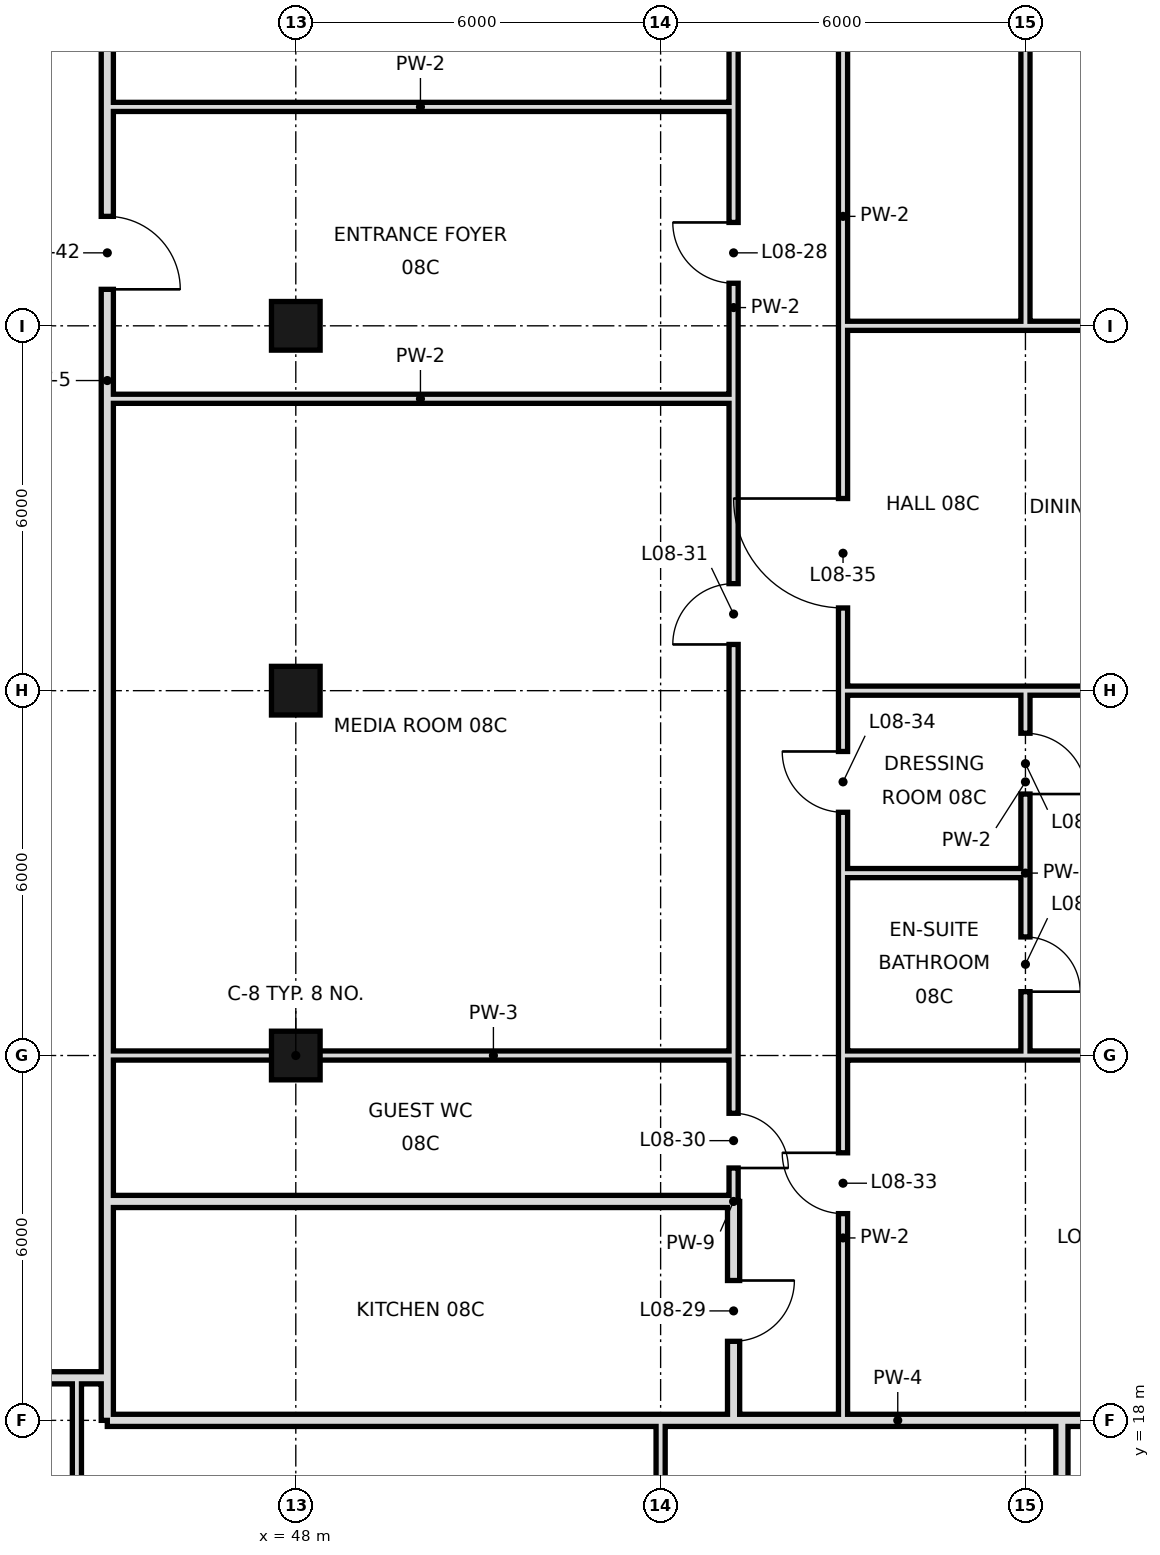
"""IFC4 building model, lengths in metres.
Left out: names, types, materials, properties, quantities, classifications, styles, units other than length and angle.
Written with IfcOpenShell. Run it as: python <this file> out.ifc"""

import sys

from ifc_helpers import new_model, si_unit, direction, frame, frame_2d, origin, origin_2d, place, context, subcontext, project, spatial, rectangle, hollow_rectangle, extrude, element, fill, save


model = new_model("IFC4")
c1 = context("Model", 3, precision=1e-05, world=origin(), true_north=direction((0.0, 1.0)))
c2 = subcontext(c1, "Body", "Model", "MODEL_VIEW")
j1 = project(units=[si_unit("LENGTHUNIT", "METRE"), si_unit("PLANEANGLEUNIT", "RADIAN")], contexts=[c1])
p1 = place(None, origin())
s1 = spatial("IfcSite", under=j1, at=p1, CompositionType="ELEMENT")
p2 = place(p1, origin())
s2 = spatial("IfcBuilding", under=s1, at=p2, CompositionType="ELEMENT")
p3 = place(p2, frame((0.0, 0.0, 49.8)))
s3 = spatial("IfcBuildingStorey", under=s2, at=p3, CompositionType="ELEMENT", Elevation=49.8)
for number, where, z_axis, x_axis in (
    (1, (48.0, 24.0, 0.0), (0.0, 0.0, 1.0), (1.0, 0.0, 0.0)),
    (2, (48.0, 30.0, 0.0), (0.0, 0.0, 1.0), (1.0, 0.0, 0.0)),
    (3, (48.0, 36.0, 0.0), (0.0, 0.0, 1.0), (1.0, 0.0, 0.0)),
):
    element("IfcColumn", number, at=place(p3, frame(where, z_axis=z_axis, x_axis=x_axis)), inside=s3, PredefinedType="COLUMN", context=c2, shape_type="SweptSolid", body=[
        extrude(hollow_rectangle(XDim=0.8, YDim=0.8, WallThickness=0.04, at=origin_2d()), origin(), (0.0, 0.0, 1.0), 3.6),
    ])
p4 = place(p3, frame((44.4, 10.8, 0.0), z_axis=(0.0, 0.0, 1.0), x_axis=(0.0, 1.0, 0.0)))
e4 = element("IfcWall", 4, at=p4, inside=s3, PredefinedType="PARTITIONING", context=c2, shape_type="SweptSolid", body=[
    extrude(rectangle(XDim=7.9, YDim=0.15, at=frame_2d((3.95, 0.0))), origin(), (0.0, 0.0, 1.0), 3.42),
])
p5 = place(p3, frame((44.9, 21.6, 0.0), z_axis=(0.0, 0.0, 1.0), x_axis=(0.0, 1.0, 0.0)))
e5 = element("IfcWall", 5, at=p5, inside=s3, PredefinedType="SOLIDWALL", context=c2, shape_type="SweptSolid", body=[
    extrude(rectangle(XDim=27.0, YDim=0.2, at=frame_2d((13.5, 0.0))), origin(), (0.0, 0.0, 1.0), 2.72),
])
p6 = place(p5, frame((15.0, 0.0, 0.0)))
e6 = element("IfcOpeningElement", 6, at=p6, cuts=e5, PredefinedType="OPENING", context=c2, shape_type="SweptSolid", body=[
    extrude(rectangle(XDim=1.2, YDim=2.4, at=frame_2d((0.6, 1.2))), frame((0.0, 0.11, 0.0), z_axis=(0.0, -1.0, 0.0), x_axis=(1.0, 0.0, 0.0)), (0.0, 0.0, 1.0), 0.22),
])
p7 = place(p3, frame((44.9, 18.0, 0.0), z_axis=(0.0, 0.0, 1.0), x_axis=(0.0, 1.0, 0.0)))
e7 = element("IfcWall", 7, at=p7, inside=s3, PredefinedType="SOLIDWALL", context=c2, shape_type="SweptSolid", body=[
    extrude(rectangle(XDim=3.6, YDim=0.2, at=frame_2d((1.8, 0.0))), origin(), (0.0, 0.0, 1.0), 2.97),
])
p8 = place(p3, frame((54.0, 10.8, 0.0), z_axis=(0.0, 0.0, 1.0), x_axis=(0.0, 1.0, 0.0)))
e8 = element("IfcWall", 8, at=p8, inside=s3, PredefinedType="PARTITIONING", context=c2, shape_type="SweptSolid", body=[
    extrude(rectangle(XDim=7.2, YDim=0.15, at=frame_2d((3.6, 0.0))), origin(), (0.0, 0.0, 1.0), 3.42),
])
p9 = place(p3, frame((55.2, 18.0, 0.0), z_axis=(0.0, 0.0, 1.0), x_axis=(0.0, 1.0, 0.0)))
e9 = element("IfcWall", 9, at=p9, inside=s3, PredefinedType="SOLIDWALL", context=c2, shape_type="SweptSolid", body=[
    extrude(rectangle(XDim=3.6, YDim=0.2, at=frame_2d((1.8, 0.0))), origin(), (0.0, 0.0, 1.0), 2.52),
])
p10 = place(p9, frame((1.3, 0.0, 0.0)))
e10 = element("IfcOpeningElement", 10, at=p10, cuts=e9, PredefinedType="OPENING", context=c2, shape_type="SweptSolid", body=[
    extrude(rectangle(XDim=1.0, YDim=2.4, at=frame_2d((0.5, 1.2))), frame((0.0, 0.11, 0.0), z_axis=(0.0, -1.0, 0.0), x_axis=(1.0, 0.0, 0.0)), (0.0, 0.0, 1.0), 0.22),
])
p11 = place(p3, frame((55.2, 24.0, 0.0), z_axis=(0.0, 0.0, 1.0), x_axis=(0.0, 1.0, 0.0)))
e11 = element("IfcWall", 11, at=p11, inside=s3, PredefinedType="PARTITIONING", context=c2, shape_type="SweptSolid", body=[
    extrude(rectangle(XDim=24.6, YDim=0.15, at=frame_2d((12.3, 0.0))), origin(), (0.0, 0.0, 1.0), 3.42),
])
p12 = place(p11, frame((12.7, 0.0, 0.0)))
e12 = element("IfcOpeningElement", 12, at=p12, cuts=e11, PredefinedType="OPENING", context=c2, shape_type="SweptSolid", body=[
    extrude(rectangle(XDim=1.0, YDim=2.4, at=frame_2d((0.5, 1.2))), frame((0.0, 0.085, 0.0), z_axis=(0.0, -1.0, 0.0), x_axis=(1.0, 0.0, 0.0)), (0.0, 0.0, 1.0), 0.17),
])
p13 = place(p11, frame((6.76, 0.0, 0.0)))
e13 = element("IfcOpeningElement", 13, at=p13, cuts=e11, PredefinedType="OPENING", context=c2, shape_type="SweptSolid", body=[
    extrude(rectangle(XDim=1.0, YDim=2.4, at=frame_2d((0.5, 1.2))), frame((0.0, 0.085, 0.0), z_axis=(0.0, -1.0, 0.0), x_axis=(1.0, 0.0, 0.0)), (0.0, 0.0, 1.0), 0.17),
])
p14 = place(p11, frame((20.68, 0.0, 0.0)))
e14 = element("IfcOpeningElement", 14, at=p14, cuts=e11, PredefinedType="OPENING", context=c2, shape_type="SweptSolid", body=[
    extrude(rectangle(XDim=1.0, YDim=2.4, at=frame_2d((0.5, 1.2))), frame((0.0, 0.085, 0.0), z_axis=(0.0, -1.0, 0.0), x_axis=(1.0, 0.0, 0.0)), (0.0, 0.0, 1.0), 0.17),
])
p15 = place(p3, frame((55.2, 21.6, 0.0), z_axis=(0.0, 0.0, 1.0), x_axis=(0.0, 1.0, 0.0)))
e15 = element("IfcWall", 15, at=p15, inside=s3, PredefinedType="PARTITIONING", context=c2, shape_type="SweptSolid", body=[
    extrude(rectangle(XDim=2.4, YDim=0.15, at=frame_2d((1.2, 0.0))), origin(), (0.0, 0.0, 1.0), 3.42),
])
p16 = place(p15, frame((0.55, 0.0, 0.0)))
e16 = element("IfcOpeningElement", 16, at=p16, cuts=e15, PredefinedType="OPENING", context=c2, shape_type="SweptSolid", body=[
    extrude(rectangle(XDim=0.9, YDim=2.4, at=frame_2d((0.45, 1.2))), frame((0.0, 0.085, 0.0), z_axis=(0.0, -1.0, 0.0), x_axis=(1.0, 0.0, 0.0)), (0.0, 0.0, 1.0), 0.17),
])
p17 = place(p3, frame((57.0, 18.0, 0.0), z_axis=(0.0, 0.0, 1.0), x_axis=(0.0, 1.0, 0.0)))
e17 = element("IfcWall", 17, at=p17, inside=s3, PredefinedType="PARTITIONING", context=c2, shape_type="SweptSolid", body=[
    extrude(rectangle(XDim=6.0, YDim=0.15, at=frame_2d((3.0, 0.0))), origin(), (0.0, 0.0, 1.0), 3.42),
])
p18 = place(p17, frame((3.4, 0.0, 0.0)))
e18 = element("IfcOpeningElement", 18, at=p18, cuts=e17, PredefinedType="OPENING", context=c2, shape_type="SweptSolid", body=[
    extrude(rectangle(XDim=1.0, YDim=2.4, at=frame_2d((0.5, 1.2))), frame((0.0, 0.085, 0.0), z_axis=(0.0, -1.0, 0.0), x_axis=(1.0, 0.0, 0.0)), (0.0, 0.0, 1.0), 0.17),
])
p19 = place(p3, frame((57.0, 27.0, 0.0), z_axis=(0.0, 0.0, 1.0), x_axis=(0.0, 1.0, 0.0)))
e19 = element("IfcWall", 19, at=p19, inside=s3, PredefinedType="PARTITIONING", context=c2, shape_type="SweptSolid", body=[
    extrude(rectangle(XDim=21.6, YDim=0.15, at=frame_2d((10.8, 0.0))), origin(), (0.0, 0.0, 1.0), 3.42),
])
p20 = place(p19, frame((1.0, 0.0, 0.0)))
e20 = element("IfcOpeningElement", 20, at=p20, cuts=e19, PredefinedType="OPENING", context=c2, shape_type="SweptSolid", body=[
    extrude(rectangle(XDim=1.0, YDim=2.4, at=frame_2d((0.5, 1.2))), frame((0.0, 0.085, 0.0), z_axis=(0.0, -1.0, 0.0), x_axis=(1.0, 0.0, 0.0)), (0.0, 0.0, 1.0), 0.17),
])
p21 = place(p19, frame((4.36, 0.0, 0.0)))
e21 = element("IfcOpeningElement", 21, at=p21, cuts=e19, PredefinedType="OPENING", context=c2, shape_type="SweptSolid", body=[
    extrude(rectangle(XDim=1.8, YDim=2.4, at=frame_2d((0.9, 1.2))), frame((0.0, 0.085, 0.0), z_axis=(0.0, -1.0, 0.0), x_axis=(1.0, 0.0, 0.0)), (0.0, 0.0, 1.0), 0.17),
])
p22 = place(p19, frame((14.1, 0.0, 0.0)))
e22 = element("IfcOpeningElement", 22, at=p22, cuts=e19, PredefinedType="OPENING", context=c2, shape_type="SweptSolid", body=[
    extrude(rectangle(XDim=1.8, YDim=2.4, at=frame_2d((0.9, 1.2))), frame((0.0, 0.085, 0.0), z_axis=(0.0, -1.0, 0.0), x_axis=(1.0, 0.0, 0.0)), (0.0, 0.0, 1.0), 0.17),
])
p23 = place(p3, frame((57.0, 24.0, 0.0), z_axis=(0.0, 0.0, 1.0), x_axis=(0.0, 1.0, 0.0)))
e23 = element("IfcWall", 23, at=p23, inside=s3, PredefinedType="PARTITIONING", context=c2, shape_type="SweptSolid", body=[
    extrude(rectangle(XDim=3.0, YDim=0.15, at=frame_2d((1.5, 0.0))), origin(), (0.0, 0.0, 1.0), 3.42),
])
p24 = place(p3, frame((60.0, 27.0, 0.0), z_axis=(0.0, 0.0, 1.0), x_axis=(0.0, 1.0, 0.0)))
e24 = element("IfcWall", 24, at=p24, inside=s3, PredefinedType="PARTITIONING", context=c2, shape_type="SweptSolid", body=[
    extrude(rectangle(XDim=3.0, YDim=0.15, at=frame_2d((1.5, 0.0))), origin(), (0.0, 0.0, 1.0), 3.42),
])
p25 = place(p24, frame((1.3, 0.0, 0.0)))
e25 = element("IfcOpeningElement", 25, at=p25, cuts=e24, PredefinedType="OPENING", context=c2, shape_type="SweptSolid", body=[
    extrude(rectangle(XDim=1.0, YDim=2.4, at=frame_2d((0.5, 1.2))), frame((0.0, 0.085, 0.0), z_axis=(0.0, -1.0, 0.0), x_axis=(1.0, 0.0, 0.0)), (0.0, 0.0, 1.0), 0.17),
])
p26 = place(p3, frame((60.0, 36.0, 0.0), z_axis=(0.0, 0.0, 1.0), x_axis=(0.0, 1.0, 0.0)))
e26 = element("IfcWall", 26, at=p26, inside=s3, PredefinedType="PARTITIONING", context=c2, shape_type="SweptSolid", body=[
    extrude(rectangle(XDim=12.0, YDim=0.15, at=frame_2d((6.0, 0.0))), origin(), (0.0, 0.0, 1.0), 3.42),
])
p27 = place(p3, frame((60.0, 24.0, 0.0), z_axis=(0.0, 0.0, 1.0), x_axis=(0.0, 1.0, 0.0)))
e27 = element("IfcWall", 27, at=p27, inside=s3, PredefinedType="PARTITIONING", context=c2, shape_type="SweptSolid", body=[
    extrude(rectangle(XDim=3.0, YDim=0.15, at=frame_2d((1.5, 0.0))), origin(), (0.0, 0.0, 1.0), 3.42),
])
p28 = place(p27, frame((1.05, 0.0, 0.0)))
e28 = element("IfcOpeningElement", 28, at=p28, cuts=e27, PredefinedType="OPENING", context=c2, shape_type="SweptSolid", body=[
    extrude(rectangle(XDim=0.9, YDim=2.4, at=frame_2d((0.45, 1.2))), frame((0.0, 0.085, 0.0), z_axis=(0.0, -1.0, 0.0), x_axis=(1.0, 0.0, 0.0)), (0.0, 0.0, 1.0), 0.17),
])
p29 = place(p3, frame((60.6, 10.8, 0.0), z_axis=(0.0, 0.0, 1.0), x_axis=(0.0, 1.0, 0.0)))
e29 = element("IfcWall", 29, at=p29, inside=s3, PredefinedType="SOLIDWALL", context=c2, shape_type="SweptSolid", body=[
    extrude(rectangle(XDim=7.2, YDim=0.2, at=frame_2d((3.6, 0.0))), origin(), (0.0, 0.0, 1.0), 2.52),
])
p30 = place(p3, frame((44.9, 18.0, 0.0), z_axis=(0.0, 0.0, 1.0), x_axis=(1.0, 0.0, 0.0)))
e30 = element("IfcWall", 30, at=p30, inside=s3, PredefinedType="SOLIDWALL", context=c2, shape_type="SweptSolid", body=[
    extrude(rectangle(XDim=10.3, YDim=0.2, at=frame_2d((5.15, 0.0))), origin(), (0.0, 0.0, 1.0), 2.52),
])
p31 = place(p3, frame((60.6, 18.0, 0.0), z_axis=(0.0, 0.0, 1.0), x_axis=(1.0, 0.0, 0.0)))
e31 = element("IfcWall", 31, at=p31, inside=s3, PredefinedType="SOLIDWALL", context=c2, shape_type="SweptSolid", body=[
    extrude(rectangle(XDim=6.0, YDim=0.2, at=frame_2d((3.0, 0.0))), origin(), (0.0, 0.0, 1.0), 2.52),
])
p32 = place(p3, frame((55.2, 18.0, 0.0), z_axis=(0.0, 0.0, 1.0), x_axis=(1.0, 0.0, 0.0)))
e32 = element("IfcWall", 32, at=p32, inside=s3, PredefinedType="SOLIDWALL", context=c2, shape_type="SweptSolid", body=[
    extrude(rectangle(XDim=5.4, YDim=0.2, at=frame_2d((2.7, 0.0))), origin(), (0.0, 0.0, 1.0), 2.52),
])
p33 = place(p3, frame((6.6, 18.7, 0.0), z_axis=(0.0, 0.0, 1.0), x_axis=(1.0, 0.0, 0.0)))
e33 = element("IfcWall", 33, at=p33, inside=s3, PredefinedType="SOLIDWALL", context=c2, shape_type="SweptSolid", body=[
    extrude(rectangle(XDim=38.3, YDim=0.2, at=frame_2d((19.15, 0.0))), origin(), (0.0, 0.0, 1.0), 2.72),
])
p34 = place(p33, frame((25.8, 0.0, 0.0)))
e34 = element("IfcOpeningElement", 34, at=p34, cuts=e33, PredefinedType="OPENING", context=c2, shape_type="SweptSolid", body=[
    extrude(rectangle(XDim=1.2, YDim=2.4, at=frame_2d((0.6, 1.2))), frame((0.0, 0.11, 0.0), z_axis=(0.0, -1.0, 0.0), x_axis=(1.0, 0.0, 0.0)), (0.0, 0.0, 1.0), 0.22),
])
p35 = place(p33, frame((33.34, 0.0, 0.0)))
e35 = element("IfcOpeningElement", 35, at=p35, cuts=e33, PredefinedType="OPENING", context=c2, shape_type="SweptSolid", body=[
    extrude(rectangle(XDim=1.2, YDim=2.4, at=frame_2d((0.6, 1.2))), frame((0.0, 0.11, 0.0), z_axis=(0.0, -1.0, 0.0), x_axis=(1.0, 0.0, 0.0)), (0.0, 0.0, 1.0), 0.22),
])
p36 = place(p3, frame((44.9, 21.6, 0.0), z_axis=(0.0, 0.0, 1.0), x_axis=(1.0, 0.0, 0.0)))
e36 = element("IfcWall", 36, at=p36, inside=s3, PredefinedType="SOLIDWALL", context=c2, shape_type="SweptSolid", body=[
    extrude(rectangle(XDim=10.3, YDim=0.2, at=frame_2d((5.15, 0.0))), origin(), (0.0, 0.0, 1.0), 2.72),
])
p37 = place(p3, frame((60.0, 24.0, 0.0), z_axis=(0.0, 0.0, 1.0), x_axis=(1.0, 0.0, 0.0)))
e37 = element("IfcWall", 37, at=p37, inside=s3, PredefinedType="PARTITIONING", context=c2, shape_type="SweptSolid", body=[
    extrude(rectangle(XDim=6.0, YDim=0.15, at=frame_2d((3.0, 0.0))), origin(), (0.0, 0.0, 1.0), 2.52),
])
p38 = place(p3, frame((44.9, 24.0, 0.0), z_axis=(0.0, 0.0, 1.0), x_axis=(1.0, 0.0, 0.0)))
e38 = element("IfcWall", 38, at=p38, inside=s3, PredefinedType="PARTITIONING", context=c2, shape_type="SweptSolid", body=[
    extrude(rectangle(XDim=10.3, YDim=0.15, at=frame_2d((5.15, 0.0))), origin(), (0.0, 0.0, 1.0), 2.52),
])
p39 = place(p3, frame((57.0, 24.0, 0.0), z_axis=(0.0, 0.0, 1.0), x_axis=(1.0, 0.0, 0.0)))
e39 = element("IfcWall", 39, at=p39, inside=s3, PredefinedType="PARTITIONING", context=c2, shape_type="SweptSolid", body=[
    extrude(rectangle(XDim=3.0, YDim=0.15, at=frame_2d((1.5, 0.0))), origin(), (0.0, 0.0, 1.0), 2.52),
])
p40 = place(p3, frame((57.0, 27.0, 0.0), z_axis=(0.0, 0.0, 1.0), x_axis=(1.0, 0.0, 0.0)))
e40 = element("IfcWall", 40, at=p40, inside=s3, PredefinedType="PARTITIONING", context=c2, shape_type="SweptSolid", body=[
    extrude(rectangle(XDim=3.0, YDim=0.15, at=frame_2d((1.5, 0.0))), origin(), (0.0, 0.0, 1.0), 3.42),
])
p41 = place(p3, frame((57.0, 30.0, 0.0), z_axis=(0.0, 0.0, 1.0), x_axis=(1.0, 0.0, 0.0)))
e41 = element("IfcWall", 41, at=p41, inside=s3, PredefinedType="PARTITIONING", context=c2, shape_type="SweptSolid", body=[
    extrude(rectangle(XDim=9.6, YDim=0.15, at=frame_2d((4.8, 0.0))), origin(), (0.0, 0.0, 1.0), 2.52),
])
p42 = place(p3, frame((44.9, 34.8, 0.0), z_axis=(0.0, 0.0, 1.0), x_axis=(1.0, 0.0, 0.0)))
e42 = element("IfcWall", 42, at=p42, inside=s3, PredefinedType="PARTITIONING", context=c2, shape_type="SweptSolid", body=[
    extrude(rectangle(XDim=10.3, YDim=0.15, at=frame_2d((5.15, 0.0))), origin(), (0.0, 0.0, 1.0), 3.42),
])
p43 = place(p3, frame((57.0, 36.0, 0.0), z_axis=(0.0, 0.0, 1.0), x_axis=(1.0, 0.0, 0.0)))
e43 = element("IfcWall", 43, at=p43, inside=s3, PredefinedType="PARTITIONING", context=c2, shape_type="SweptSolid", body=[
    extrude(rectangle(XDim=9.0, YDim=0.15, at=frame_2d((4.5, 0.0))), origin(), (0.0, 0.0, 1.0), 2.52),
])
p44 = place(p43, frame((5.1, 0.0, 0.0)))
e44 = element("IfcOpeningElement", 44, at=p44, cuts=e43, PredefinedType="OPENING", context=c2, shape_type="SweptSolid", body=[
    extrude(rectangle(XDim=1.8, YDim=2.4, at=frame_2d((0.9, 1.2))), frame((0.0, 0.085, 0.0), z_axis=(0.0, -1.0, 0.0), x_axis=(1.0, 0.0, 0.0)), (0.0, 0.0, 1.0), 0.17),
])
p45 = place(p3, frame((44.9, 39.6, 0.0), z_axis=(0.0, 0.0, 1.0), x_axis=(1.0, 0.0, 0.0)))
e45 = element("IfcWall", 45, at=p45, inside=s3, PredefinedType="PARTITIONING", context=c2, shape_type="SweptSolid", body=[
    extrude(rectangle(XDim=10.3, YDim=0.15, at=frame_2d((5.15, 0.0))), origin(), (0.0, 0.0, 1.0), 3.42),
])
p46 = place(p12, frame((1.0, 0.0, 0.0), z_axis=(0.0, 0.0, 1.0), x_axis=(-1.0, 0.0, 0.0)))
e46 = element("IfcDoor", 46, at=p46, inside=s3, OperationType="SINGLE_SWING_LEFT", PredefinedType="DOOR", context=c2, shape_type="SweptSolid", body=[
    extrude(rectangle(XDim=1.0, YDim=2.4, at=frame_2d((0.5, 1.2))), frame((0.0, 0.025, 0.0), z_axis=(0.0, -1.0, 0.0), x_axis=(1.0, 0.0, 0.0)), (0.0, 0.0, 1.0), 0.05),
])
fill(e12, e46)
p47 = place(p10, origin())
e47 = element("IfcDoor", 47, at=p47, inside=s3, OperationType="SINGLE_SWING_RIGHT", PredefinedType="DOOR", context=c2, shape_type="SweptSolid", body=[
    extrude(rectangle(XDim=1.0, YDim=2.4, at=frame_2d((0.5, 1.2))), frame((0.0, 0.025, 0.0), z_axis=(0.0, -1.0, 0.0), x_axis=(1.0, 0.0, 0.0)), (0.0, 0.0, 1.0), 0.05),
])
fill(e10, e47)
p48 = place(p16, frame((0.9, 0.0, 0.0), z_axis=(0.0, 0.0, 1.0), x_axis=(-1.0, 0.0, 0.0)))
e48 = element("IfcDoor", 48, at=p48, inside=s3, OperationType="SINGLE_SWING_RIGHT", PredefinedType="DOOR", context=c2, shape_type="SweptSolid", body=[
    extrude(rectangle(XDim=0.9, YDim=2.4, at=frame_2d((0.45, 1.2))), frame((0.0, 0.025, 0.0), z_axis=(0.0, -1.0, 0.0), x_axis=(1.0, 0.0, 0.0)), (0.0, 0.0, 1.0), 0.05),
])
fill(e16, e48)
p49 = place(p13, origin())
e49 = element("IfcDoor", 49, at=p49, inside=s3, OperationType="SINGLE_SWING_LEFT", PredefinedType="DOOR", context=c2, shape_type="SweptSolid", body=[
    extrude(rectangle(XDim=1.0, YDim=2.4, at=frame_2d((0.5, 1.2))), frame((0.0, 0.025, 0.0), z_axis=(0.0, -1.0, 0.0), x_axis=(1.0, 0.0, 0.0)), (0.0, 0.0, 1.0), 0.05),
])
fill(e13, e49)
p50 = place(p18, frame((1.0, 0.0, 0.0), z_axis=(0.0, 0.0, 1.0), x_axis=(-1.0, 0.0, 0.0)))
e50 = element("IfcDoor", 50, at=p50, inside=s3, OperationType="SINGLE_SWING_LEFT", PredefinedType="DOOR", context=c2, shape_type="SweptSolid", body=[
    extrude(rectangle(XDim=1.0, YDim=2.4, at=frame_2d((0.5, 1.2))), frame((0.0, 0.025, 0.0), z_axis=(0.0, -1.0, 0.0), x_axis=(1.0, 0.0, 0.0)), (0.0, 0.0, 1.0), 0.05),
])
fill(e18, e50)
p51 = place(p20, frame((1.0, 0.0, 0.0), z_axis=(0.0, 0.0, 1.0), x_axis=(-1.0, 0.0, 0.0)))
e51 = element("IfcDoor", 51, at=p51, inside=s3, OperationType="SINGLE_SWING_LEFT", PredefinedType="DOOR", context=c2, shape_type="SweptSolid", body=[
    extrude(rectangle(XDim=1.0, YDim=2.4, at=frame_2d((0.5, 1.2))), frame((0.0, 0.025, 0.0), z_axis=(0.0, -1.0, 0.0), x_axis=(1.0, 0.0, 0.0)), (0.0, 0.0, 1.0), 0.05),
])
fill(e20, e51)
p52 = place(p21, frame((1.8, 0.0, 0.0), z_axis=(0.0, 0.0, 1.0), x_axis=(-1.0, 0.0, 0.0)))
e52 = element("IfcDoor", 52, at=p52, inside=s3, OperationType="SINGLE_SWING_LEFT", PredefinedType="DOOR", context=c2, shape_type="SweptSolid", body=[
    extrude(rectangle(XDim=1.8, YDim=2.4, at=frame_2d((0.9, 1.2))), frame((0.0, 0.025, 0.0), z_axis=(0.0, -1.0, 0.0), x_axis=(1.0, 0.0, 0.0)), (0.0, 0.0, 1.0), 0.05),
])
fill(e21, e52)
p53 = place(p25, frame((1.0, 0.0, 0.0), z_axis=(0.0, 0.0, 1.0), x_axis=(-1.0, 0.0, 0.0)))
e53 = element("IfcDoor", 53, at=p53, inside=s3, OperationType="SINGLE_SWING_RIGHT", PredefinedType="DOOR", context=c2, shape_type="SweptSolid", body=[
    extrude(rectangle(XDim=1.0, YDim=2.4, at=frame_2d((0.5, 1.2))), frame((0.0, 0.025, 0.0), z_axis=(0.0, -1.0, 0.0), x_axis=(1.0, 0.0, 0.0)), (0.0, 0.0, 1.0), 0.05),
])
fill(e25, e53)
p54 = place(p28, frame((0.9, 0.0, 0.0), z_axis=(0.0, 0.0, 1.0), x_axis=(-1.0, 0.0, 0.0)))
e54 = element("IfcDoor", 54, at=p54, inside=s3, OperationType="SINGLE_SWING_RIGHT", PredefinedType="DOOR", context=c2, shape_type="SweptSolid", body=[
    extrude(rectangle(XDim=0.9, YDim=2.4, at=frame_2d((0.45, 1.2))), frame((0.0, 0.025, 0.0), z_axis=(0.0, -1.0, 0.0), x_axis=(1.0, 0.0, 0.0)), (0.0, 0.0, 1.0), 0.05),
])
fill(e28, e54)
p55 = place(p6, frame((1.2, 0.0, 0.0), z_axis=(0.0, 0.0, 1.0), x_axis=(-1.0, 0.0, 0.0)))
e55 = element("IfcDoor", 55, at=p55, inside=s3, OperationType="SINGLE_SWING_RIGHT", PredefinedType="DOOR", context=c2, shape_type="SweptSolid", body=[
    extrude(rectangle(XDim=1.2, YDim=2.4, at=frame_2d((0.6, 1.2))), frame((0.0, 0.025, 0.0), z_axis=(0.0, -1.0, 0.0), x_axis=(1.0, 0.0, 0.0)), (0.0, 0.0, 1.0), 0.05),
])
fill(e6, e55)
save(model, sys.argv[1])
